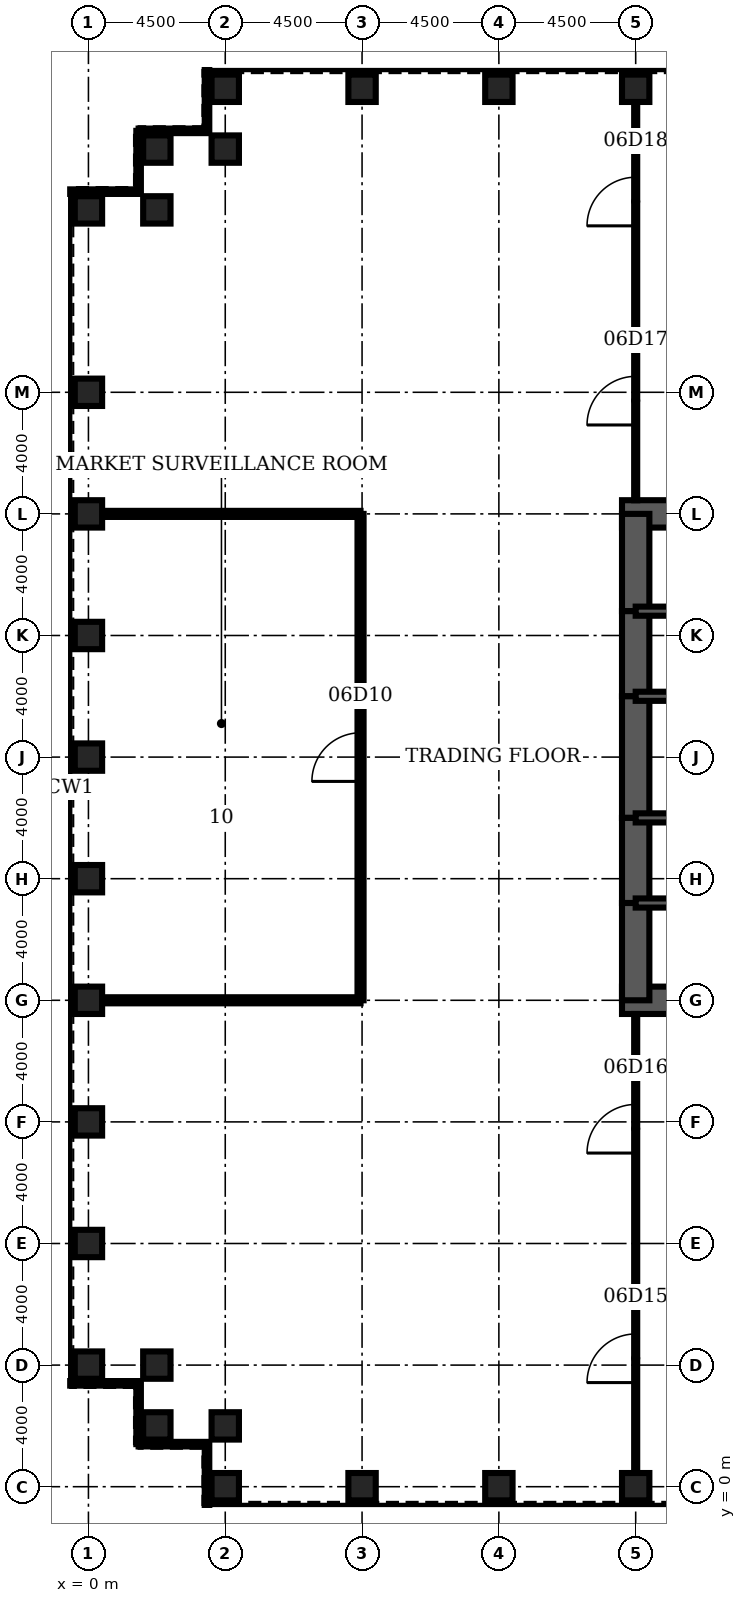
"""IFC4 building model, lengths in metres.
Left out: names, types, materials, properties, quantities, classifications, styles, units other than length and angle.
Written with IfcOpenShell. Run it as: python <this file> out.ifc"""

import sys

from ifc_helpers import new_model, si_unit, direction, frame, frame_2d, origin, origin_2d, place, context, subcontext, project, spatial, rectangle, hollow_rectangle, extrude, element, fill, save


model = new_model("IFC4")
c1 = context("Model", 3, precision=1e-05, world=origin(), true_north=direction((0.0, 1.0)))
c2 = subcontext(c1, "Body", "Model", "MODEL_VIEW")
j1 = project(units=[si_unit("LENGTHUNIT", "METRE"), si_unit("PLANEANGLEUNIT", "RADIAN")], contexts=[c1])
p1 = place(None, origin())
s1 = spatial("IfcSite", under=j1, at=p1, CompositionType="ELEMENT")
p2 = place(p1, origin())
s2 = spatial("IfcBuilding", under=s1, at=p2, CompositionType="ELEMENT")
p3 = place(p2, frame((0.0, 0.0, 32.0)))
s3 = spatial("IfcBuildingStorey", under=s2, at=p3, CompositionType="ELEMENT", Elevation=32.0)
for number, where, z_axis, x_axis in (
    (1, (4.5, 0.0, 0.0), (0.0, 0.0, 1.0), (0.0, 1.0, 0.0)),
    (2, (9.0, 0.0, 0.0), (0.0, 0.0, 1.0), (0.0, 1.0, 0.0)),
    (3, (13.5, 0.0, 0.0), (0.0, 0.0, 1.0), (0.0, 1.0, 0.0)),
    (4, (18.0, 0.0, 0.0), (0.0, 0.0, 1.0), (0.0, 1.0, 0.0)),
    (5, (18.0, 46.0, 0.0), (0.0, 0.0, 1.0), (0.0, 1.0, 0.0)),
    (6, (13.5, 46.0, 0.0), (0.0, 0.0, 1.0), (0.0, 1.0, 0.0)),
    (7, (9.0, 46.0, 0.0), (0.0, 0.0, 1.0), (0.0, 1.0, 0.0)),
    (8, (4.5, 46.0, 0.0), (0.0, 0.0, 1.0), (0.0, 1.0, 0.0)),
    (9, (4.5, 44.0, 0.0), (0.0, 0.0, 1.0), (0.0, 1.0, 0.0)),
    (10, (2.25, 44.0, 0.0), (0.0, 0.0, 1.0), (1.0, 0.0, 0.0)),
    (11, (2.25, 42.0, 0.0), (0.0, 0.0, 1.0), (1.0, 0.0, 0.0)),
    (12, (0.0, 42.0, 0.0), (0.0, 0.0, 1.0), (1.0, 0.0, 0.0)),
    (13, (0.0, 36.0, 0.0), (0.0, 0.0, 1.0), (1.0, 0.0, 0.0)),
    (14, (0.0, 32.0, 0.0), (0.0, 0.0, 1.0), (1.0, 0.0, 0.0)),
    (15, (0.0, 28.0, 0.0), (0.0, 0.0, 1.0), (1.0, 0.0, 0.0)),
    (16, (0.0, 24.0, 0.0), (0.0, 0.0, 1.0), (1.0, 0.0, 0.0)),
    (17, (0.0, 20.0, 0.0), (0.0, 0.0, 1.0), (1.0, 0.0, 0.0)),
    (18, (0.0, 16.0, 0.0), (0.0, 0.0, 1.0), (1.0, 0.0, 0.0)),
    (19, (0.0, 12.0, 0.0), (0.0, 0.0, 1.0), (1.0, 0.0, 0.0)),
    (20, (0.0, 8.0, 0.0), (0.0, 0.0, 1.0), (1.0, 0.0, 0.0)),
    (21, (0.0, 4.0, 0.0), (0.0, 0.0, 1.0), (1.0, 0.0, 0.0)),
    (22, (2.25, 4.0, 0.0), (0.0, 0.0, 1.0), (1.0, 0.0, 0.0)),
    (23, (2.25, 2.0, 0.0), (0.0, 0.0, 1.0), (1.0, 0.0, 0.0)),
    (24, (4.5, 2.0, 0.0), (0.0, 0.0, 1.0), (0.0, 1.0, 0.0)),
):
    element("IfcColumn", number, at=place(p3, frame(where, z_axis=z_axis, x_axis=x_axis)), inside=s3, PredefinedType="COLUMN", context=c2, shape_type="SweptSolid", body=[
        extrude(hollow_rectangle(XDim=0.9, YDim=0.9, WallThickness=0.12, at=origin_2d()), origin(), (0.0, 0.0, 1.0), 4.5),
    ])
for number, where, z_axis, x_axis in (
    (25, (17.55, 16.0, 0.0), (0.0, 0.0, 1.0), (1.0, 0.0, 0.0)),
    (26, (27.0, 32.0, 0.0), (0.0, 0.0, 1.0), (-1.0, 0.0, 0.0)),
):
    element("IfcWall", number, at=place(p3, frame(where, z_axis=z_axis, x_axis=x_axis)), inside=s3, PredefinedType="SHEAR", context=c2, shape_type="SweptSolid", body=[
        extrude(rectangle(XDim=9.45, YDim=0.9, at=frame_2d((4.725, 0.0))), origin(), (0.0, 0.0, 1.0), 4.5),
    ])
p4 = place(p3, frame((18.0, 32.0, 0.0), z_axis=(0.0, 0.0, 1.0), x_axis=(0.0, -1.0, 0.0)))
e27 = element("IfcWall", 27, at=p4, inside=s3, PredefinedType="SHEAR", context=c2, shape_type="SweptSolid", body=[
    extrude(rectangle(XDim=3.2, YDim=0.9, at=frame_2d((1.6, 0.0))), origin(), (0.0, 0.0, 1.0), 4.5),
])
p5 = place(p3, frame((18.0, 28.8, 0.0), z_axis=(0.0, 0.0, 1.0), x_axis=(0.0, -1.0, 0.0)))
e28 = element("IfcWall", 28, at=p5, inside=s3, PredefinedType="SHEAR", context=c2, shape_type="SweptSolid", body=[
    extrude(rectangle(XDim=2.8, YDim=0.9, at=frame_2d((1.4, 0.0))), origin(), (0.0, 0.0, 1.0), 4.5),
])
p6 = place(p5, frame((0.4, 0.0, 0.0)))
e29 = element("IfcOpeningElement", 29, at=p6, cuts=e28, PredefinedType="OPENING", context=c2, shape_type="SweptSolid", body=[
    extrude(rectangle(XDim=1.8, YDim=2.1, at=frame_2d((0.9, 1.05))), frame((0.0, 0.46, 0.0), z_axis=(0.0, -1.0, 0.0), x_axis=(1.0, 0.0, 0.0)), (0.0, 0.0, 1.0), 0.92),
])
p7 = place(p3, frame((18.0, 26.0, 0.0), z_axis=(0.0, 0.0, 1.0), x_axis=(0.0, -1.0, 0.0)))
e30 = element("IfcWall", 30, at=p7, inside=s3, PredefinedType="SHEAR", context=c2, shape_type="SweptSolid", body=[
    extrude(rectangle(XDim=4.0, YDim=0.9, at=frame_2d((2.0, 0.0))), origin(), (0.0, 0.0, 1.0), 4.5),
])
p8 = place(p3, frame((18.0, 22.0, 0.0), z_axis=(0.0, 0.0, 1.0), x_axis=(0.0, -1.0, 0.0)))
e31 = element("IfcWall", 31, at=p8, inside=s3, PredefinedType="SHEAR", context=c2, shape_type="SweptSolid", body=[
    extrude(rectangle(XDim=2.8, YDim=0.9, at=frame_2d((1.4, 0.0))), origin(), (0.0, 0.0, 1.0), 4.5),
])
p9 = place(p8, frame((0.6, 0.0, 0.0)))
e32 = element("IfcOpeningElement", 32, at=p9, cuts=e31, PredefinedType="OPENING", context=c2, shape_type="SweptSolid", body=[
    extrude(rectangle(XDim=1.8, YDim=2.1, at=frame_2d((0.9, 1.05))), frame((0.0, 0.46, 0.0), z_axis=(0.0, -1.0, 0.0), x_axis=(1.0, 0.0, 0.0)), (0.0, 0.0, 1.0), 0.92),
])
p10 = place(p3, frame((18.0, 19.2, 0.0), z_axis=(0.0, 0.0, 1.0), x_axis=(0.0, -1.0, 0.0)))
e33 = element("IfcWall", 33, at=p10, inside=s3, PredefinedType="SHEAR", context=c2, shape_type="SweptSolid", body=[
    extrude(rectangle(XDim=3.2, YDim=0.9, at=frame_2d((1.6, 0.0))), origin(), (0.0, 0.0, 1.0), 4.5),
])
p11 = place(p3, frame((18.0, 19.2, 0.0), z_axis=(0.0, 0.0, 1.0), x_axis=(1.0, 0.0, 0.0)))
e34 = element("IfcWall", 34, at=p11, inside=s3, PredefinedType="SOLIDWALL", context=c2, shape_type="SweptSolid", body=[
    extrude(rectangle(XDim=9.0, YDim=0.3, at=frame_2d((4.5, 0.0))), origin(), (0.0, 0.0, 1.0), 4.5),
])
p12 = place(p11, frame((0.65, 0.0, 0.0)))
e35 = element("IfcOpeningElement", 35, at=p12, cuts=e34, PredefinedType="OPENING", context=c2, shape_type="SweptSolid", body=[
    extrude(rectangle(XDim=1.0, YDim=2.1, at=frame_2d((0.5, 1.05))), frame((0.0, 0.16, 0.0), z_axis=(0.0, -1.0, 0.0), x_axis=(1.0, 0.0, 0.0)), (0.0, 0.0, 1.0), 0.32),
])
p13 = place(p3, frame((18.0, 28.8, 0.0), z_axis=(0.0, 0.0, 1.0), x_axis=(1.0, 0.0, 0.0)))
e36 = element("IfcWall", 36, at=p13, inside=s3, PredefinedType="SOLIDWALL", context=c2, shape_type="SweptSolid", body=[
    extrude(rectangle(XDim=9.0, YDim=0.3, at=frame_2d((4.5, 0.0))), origin(), (0.0, 0.0, 1.0), 4.5),
])
p14 = place(p13, frame((0.65, 0.0, 0.0)))
e37 = element("IfcOpeningElement", 37, at=p14, cuts=e36, PredefinedType="OPENING", context=c2, shape_type="SweptSolid", body=[
    extrude(rectangle(XDim=1.0, YDim=2.1, at=frame_2d((0.5, 1.05))), frame((0.0, 0.16, 0.0), z_axis=(0.0, -1.0, 0.0), x_axis=(1.0, 0.0, 0.0)), (0.0, 0.0, 1.0), 0.32),
])
p15 = place(p3, frame((18.0, 22.0, 0.0), z_axis=(0.0, 0.0, 1.0), x_axis=(1.0, 0.0, 0.0)))
e38 = element("IfcWall", 38, at=p15, inside=s3, PredefinedType="SOLIDWALL", context=c2, shape_type="SweptSolid", body=[
    extrude(rectangle(XDim=6.0, YDim=0.3, at=frame_2d((3.0, 0.0))), origin(), (0.0, 0.0, 1.0), 4.5),
])
p16 = place(p15, frame((4.4, 0.0, 0.0)))
e39 = element("IfcOpeningElement", 39, at=p16, cuts=e38, PredefinedType="OPENING", context=c2, shape_type="SweptSolid", body=[
    extrude(rectangle(XDim=1.0, YDim=2.1, at=frame_2d((0.5, 1.05))), frame((0.0, 0.16, 0.0), z_axis=(0.0, -1.0, 0.0), x_axis=(1.0, 0.0, 0.0)), (0.0, 0.0, 1.0), 0.32),
])
p17 = place(p15, frame((1.0, 0.0, 0.0)))
e40 = element("IfcOpeningElement", 40, at=p17, cuts=e38, PredefinedType="OPENING", context=c2, shape_type="SweptSolid", body=[
    extrude(rectangle(XDim=1.0, YDim=2.1, at=frame_2d((0.5, 1.05))), frame((0.0, 0.16, 0.0), z_axis=(0.0, -1.0, 0.0), x_axis=(1.0, 0.0, 0.0)), (0.0, 0.0, 1.0), 0.32),
])
p18 = place(p3, frame((18.0, 26.0, 0.0), z_axis=(0.0, 0.0, 1.0), x_axis=(1.0, 0.0, 0.0)))
e41 = element("IfcWall", 41, at=p18, inside=s3, PredefinedType="SOLIDWALL", context=c2, shape_type="SweptSolid", body=[
    extrude(rectangle(XDim=6.0, YDim=0.3, at=frame_2d((3.0, 0.0))), origin(), (0.0, 0.0, 1.0), 4.5),
])
for number, where, z_axis, x_axis in (
    (42, (0.45, 16.0, 0.0), (0.0, 0.0, 1.0), (1.0, 0.0, 0.0)),
    (43, (0.45, 32.0, 0.0), (0.0, 0.0, 1.0), (1.0, 0.0, 0.0)),
):
    element("IfcWall", number, at=place(p3, frame(where, z_axis=z_axis, x_axis=x_axis)), inside=s3, PredefinedType="PARTITIONING", context=c2, shape_type="SweptSolid", body=[
        extrude(rectangle(XDim=8.5, YDim=0.2, at=frame_2d((4.25, 0.0))), origin(), (0.0, 0.0, 1.0), 3.0),
    ])
p19 = place(p3, frame((8.95, 16.0, 0.0), z_axis=(0.0, 0.0, 1.0), x_axis=(0.0, 1.0, 0.0)))
e44 = element("IfcWall", 44, at=p19, inside=s3, PredefinedType="PARTITIONING", context=c2, shape_type="SweptSolid", body=[
    extrude(rectangle(XDim=16.0, YDim=0.2, at=frame_2d((8.0, 0.0))), origin(), (0.0, 0.0, 1.0), 3.0),
])
p20 = place(p19, frame((7.2, 0.0, 0.0)))
e45 = element("IfcOpeningElement", 45, at=p20, cuts=e44, PredefinedType="OPENING", context=c2, shape_type="SweptSolid", body=[
    extrude(rectangle(XDim=1.6, YDim=2.1, at=frame_2d((0.8, 1.05))), frame((0.0, 0.11, 0.0), z_axis=(0.0, -1.0, 0.0), x_axis=(1.0, 0.0, 0.0)), (0.0, 0.0, 1.0), 0.22),
])
p21 = place(p3, frame((18.0, 0.45, 0.0), z_axis=(0.0, 0.0, 1.0), x_axis=(0.0, 1.0, 0.0)))
e46 = element("IfcWall", 46, at=p21, inside=s3, PredefinedType="PARTITIONING", context=c2, shape_type="SweptSolid", body=[
    extrude(rectangle(XDim=15.1, YDim=0.1, at=frame_2d((7.55, 0.0))), origin(), (0.0, 0.0, 1.0), 3.0),
])
p22 = place(p21, frame((2.975, 0.0, 0.0)))
e47 = element("IfcOpeningElement", 47, at=p22, cuts=e46, PredefinedType="OPENING", context=c2, shape_type="SweptSolid", body=[
    extrude(rectangle(XDim=1.6, YDim=2.1, at=frame_2d((0.8, 1.05))), frame((0.0, 0.06, 0.0), z_axis=(0.0, -1.0, 0.0), x_axis=(1.0, 0.0, 0.0)), (0.0, 0.0, 1.0), 0.12),
])
p23 = place(p21, frame((10.525, 0.0, 0.0)))
e48 = element("IfcOpeningElement", 48, at=p23, cuts=e46, PredefinedType="OPENING", context=c2, shape_type="SweptSolid", body=[
    extrude(rectangle(XDim=1.6, YDim=2.1, at=frame_2d((0.8, 1.05))), frame((0.0, 0.06, 0.0), z_axis=(0.0, -1.0, 0.0), x_axis=(1.0, 0.0, 0.0)), (0.0, 0.0, 1.0), 0.12),
])
p24 = place(p3, frame((18.0, 32.45, 0.0), z_axis=(0.0, 0.0, 1.0), x_axis=(0.0, 1.0, 0.0)))
e49 = element("IfcWall", 49, at=p24, inside=s3, PredefinedType="PARTITIONING", context=c2, shape_type="SweptSolid", body=[
    extrude(rectangle(XDim=13.1, YDim=0.1, at=frame_2d((6.55, 0.0))), origin(), (0.0, 0.0, 1.0), 3.0),
])
p25 = place(p24, frame((2.475, 0.0, 0.0)))
e50 = element("IfcOpeningElement", 50, at=p25, cuts=e49, PredefinedType="OPENING", context=c2, shape_type="SweptSolid", body=[
    extrude(rectangle(XDim=1.6, YDim=2.1, at=frame_2d((0.8, 1.05))), frame((0.0, 0.06, 0.0), z_axis=(0.0, -1.0, 0.0), x_axis=(1.0, 0.0, 0.0)), (0.0, 0.0, 1.0), 0.12),
])
p26 = place(p24, frame((9.025, 0.0, 0.0)))
e51 = element("IfcOpeningElement", 51, at=p26, cuts=e49, PredefinedType="OPENING", context=c2, shape_type="SweptSolid", body=[
    extrude(rectangle(XDim=1.6, YDim=2.1, at=frame_2d((0.8, 1.05))), frame((0.0, 0.06, 0.0), z_axis=(0.0, -1.0, 0.0), x_axis=(1.0, 0.0, 0.0)), (0.0, 0.0, 1.0), 0.12),
])
p27 = place(p3, frame((3.9, 46.6, 0.0), z_axis=(0.0, 0.0, 1.0), x_axis=(0.0, -1.0, 0.0)))
e52 = element("IfcWall", 52, at=p27, inside=s3, PredefinedType="ELEMENTEDWALL", context=c2, shape_type="SweptSolid", body=[
    extrude(rectangle(XDim=2.0, YDim=0.15, at=frame_2d((1.0, 0.0))), origin(), (0.0, 0.0, 1.0), 4.32),
])
p28 = place(p3, frame((3.9, 44.6, 0.0), z_axis=(0.0, 0.0, 1.0), x_axis=(-1.0, 0.0, 0.0)))
e53 = element("IfcWall", 53, at=p28, inside=s3, PredefinedType="ELEMENTEDWALL", context=c2, shape_type="SweptSolid", body=[
    extrude(rectangle(XDim=2.25, YDim=0.15, at=frame_2d((1.125, 0.0))), origin(), (0.0, 0.0, 1.0), 4.32),
])
p29 = place(p3, frame((1.65, 44.6, 0.0), z_axis=(0.0, 0.0, 1.0), x_axis=(0.0, -1.0, 0.0)))
e54 = element("IfcWall", 54, at=p29, inside=s3, PredefinedType="ELEMENTEDWALL", context=c2, shape_type="SweptSolid", body=[
    extrude(rectangle(XDim=2.0, YDim=0.15, at=frame_2d((1.0, 0.0))), origin(), (0.0, 0.0, 1.0), 4.32),
])
for number, where, z_axis, x_axis in (
    (55, (1.65, 42.6, 0.0), (0.0, 0.0, 1.0), (-1.0, 0.0, 0.0)),
    (56, (-0.6, 3.4, 0.0), (0.0, 0.0, 1.0), (1.0, 0.0, 0.0)),
):
    element("IfcWall", number, at=place(p3, frame(where, z_axis=z_axis, x_axis=x_axis)), inside=s3, PredefinedType="ELEMENTEDWALL", context=c2, shape_type="SweptSolid", body=[
        extrude(rectangle(XDim=2.25, YDim=0.15, at=frame_2d((1.125, 0.0))), origin(), (0.0, 0.0, 1.0), 4.32),
    ])
p30 = place(p3, frame((1.65, 3.4, 0.0), z_axis=(0.0, 0.0, 1.0), x_axis=(0.0, -1.0, 0.0)))
e57 = element("IfcWall", 57, at=p30, inside=s3, PredefinedType="ELEMENTEDWALL", context=c2, shape_type="SweptSolid", body=[
    extrude(rectangle(XDim=2.0, YDim=0.15, at=frame_2d((1.0, 0.0))), origin(), (0.0, 0.0, 1.0), 4.32),
])
p31 = place(p3, frame((1.65, 1.4, 0.0), z_axis=(0.0, 0.0, 1.0), x_axis=(1.0, 0.0, 0.0)))
e58 = element("IfcWall", 58, at=p31, inside=s3, PredefinedType="ELEMENTEDWALL", context=c2, shape_type="SweptSolid", body=[
    extrude(rectangle(XDim=2.25, YDim=0.15, at=frame_2d((1.125, 0.0))), origin(), (0.0, 0.0, 1.0), 4.32),
])
p32 = place(p3, frame((3.9, 1.4, 0.0), z_axis=(0.0, 0.0, 1.0), x_axis=(0.0, -1.0, 0.0)))
e59 = element("IfcWall", 59, at=p32, inside=s3, PredefinedType="ELEMENTEDWALL", context=c2, shape_type="SweptSolid", body=[
    extrude(rectangle(XDim=2.0, YDim=0.15, at=frame_2d((1.0, 0.0))), origin(), (0.0, 0.0, 1.0), 4.32),
])
p33 = place(p20, origin())
e60 = element("IfcDoor", 60, at=p33, inside=s3, OperationType="SINGLE_SWING_LEFT", PredefinedType="DOOR", context=c2, shape_type="SweptSolid", body=[
    extrude(rectangle(XDim=1.6, YDim=2.1, at=frame_2d((0.8, 1.05))), frame((0.0, 0.025, 0.0), z_axis=(0.0, -1.0, 0.0), x_axis=(1.0, 0.0, 0.0)), (0.0, 0.0, 1.0), 0.05),
])
fill(e45, e60)
p34 = place(p22, origin())
e61 = element("IfcDoor", 61, at=p34, inside=s3, OperationType="SINGLE_SWING_LEFT", PredefinedType="DOOR", context=c2, shape_type="SweptSolid", body=[
    extrude(rectangle(XDim=1.6, YDim=2.1, at=frame_2d((0.8, 1.05))), frame((0.0, 0.025, 0.0), z_axis=(0.0, -1.0, 0.0), x_axis=(1.0, 0.0, 0.0)), (0.0, 0.0, 1.0), 0.05),
])
fill(e47, e61)
p35 = place(p23, origin())
e62 = element("IfcDoor", 62, at=p35, inside=s3, OperationType="SINGLE_SWING_LEFT", PredefinedType="DOOR", context=c2, shape_type="SweptSolid", body=[
    extrude(rectangle(XDim=1.6, YDim=2.1, at=frame_2d((0.8, 1.05))), frame((0.0, 0.025, 0.0), z_axis=(0.0, -1.0, 0.0), x_axis=(1.0, 0.0, 0.0)), (0.0, 0.0, 1.0), 0.05),
])
fill(e48, e62)
p36 = place(p25, origin())
e63 = element("IfcDoor", 63, at=p36, inside=s3, OperationType="SINGLE_SWING_LEFT", PredefinedType="DOOR", context=c2, shape_type="SweptSolid", body=[
    extrude(rectangle(XDim=1.6, YDim=2.1, at=frame_2d((0.8, 1.05))), frame((0.0, 0.025, 0.0), z_axis=(0.0, -1.0, 0.0), x_axis=(1.0, 0.0, 0.0)), (0.0, 0.0, 1.0), 0.05),
])
fill(e50, e63)
p37 = place(p26, origin())
e64 = element("IfcDoor", 64, at=p37, inside=s3, OperationType="SINGLE_SWING_LEFT", PredefinedType="DOOR", context=c2, shape_type="SweptSolid", body=[
    extrude(rectangle(XDim=1.6, YDim=2.1, at=frame_2d((0.8, 1.05))), frame((0.0, 0.025, 0.0), z_axis=(0.0, -1.0, 0.0), x_axis=(1.0, 0.0, 0.0)), (0.0, 0.0, 1.0), 0.05),
])
fill(e51, e64)
p38 = place(p12, origin())
e65 = element("IfcDoor", 65, at=p38, inside=s3, OperationType="SINGLE_SWING_LEFT", PredefinedType="DOOR", context=c2, shape_type="SweptSolid", body=[
    extrude(rectangle(XDim=1.0, YDim=2.1, at=frame_2d((0.5, 1.05))), frame((0.0, 0.025, 0.0), z_axis=(0.0, -1.0, 0.0), x_axis=(1.0, 0.0, 0.0)), (0.0, 0.0, 1.0), 0.05),
])
fill(e35, e65)
p39 = place(p14, origin())
e66 = element("IfcDoor", 66, at=p39, inside=s3, OperationType="SINGLE_SWING_LEFT", PredefinedType="DOOR", context=c2, shape_type="SweptSolid", body=[
    extrude(rectangle(XDim=1.0, YDim=2.1, at=frame_2d((0.5, 1.05))), frame((0.0, 0.025, 0.0), z_axis=(0.0, -1.0, 0.0), x_axis=(1.0, 0.0, 0.0)), (0.0, 0.0, 1.0), 0.05),
])
fill(e37, e66)
p40 = place(p9, origin())
e67 = element("IfcDoor", 67, at=p40, inside=s3, OperationType="SINGLE_SWING_LEFT", PredefinedType="DOOR", context=c2, shape_type="SweptSolid", body=[
    extrude(rectangle(XDim=1.8, YDim=2.1, at=frame_2d((0.9, 1.05))), frame((0.0, 0.45, 0.0), z_axis=(0.0, -1.0, 0.0), x_axis=(1.0, 0.0, 0.0)), (0.0, 0.0, 1.0), 0.899),
])
fill(e32, e67)
p41 = place(p6, origin())
e68 = element("IfcDoor", 68, at=p41, inside=s3, OperationType="SINGLE_SWING_LEFT", PredefinedType="DOOR", context=c2, shape_type="SweptSolid", body=[
    extrude(rectangle(XDim=1.8, YDim=2.1, at=frame_2d((0.9, 1.05))), frame((0.0, 0.45, 0.0), z_axis=(0.0, -1.0, 0.0), x_axis=(1.0, 0.0, 0.0)), (0.0, 0.0, 1.0), 0.899),
])
fill(e29, e68)
save(model, sys.argv[1])
